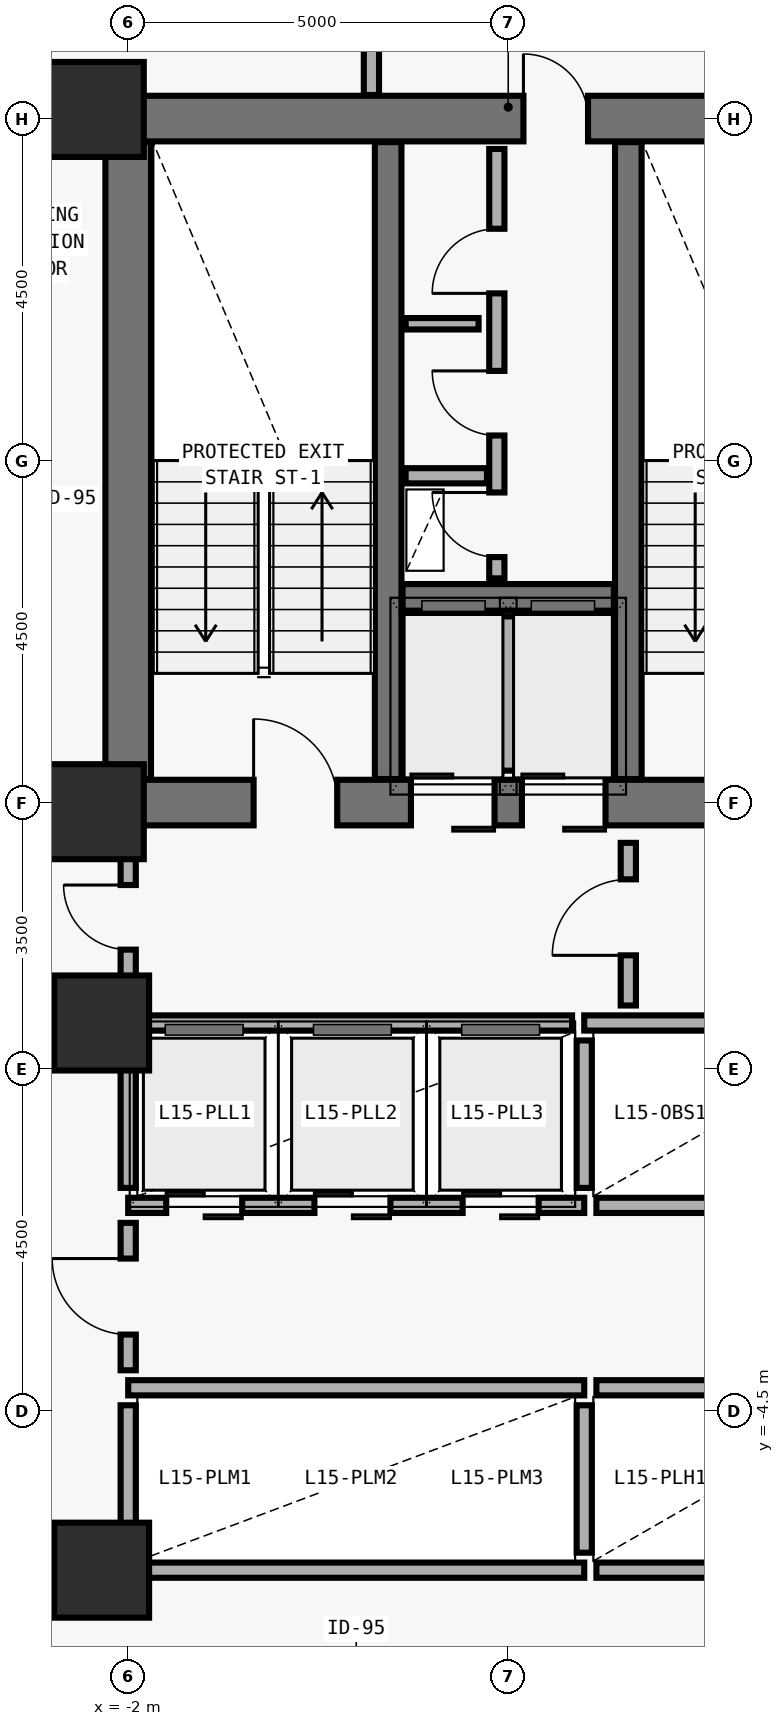
"""IFC4 building model, lengths in metres.
Left out: names, types, materials, properties, quantities, classifications, styles, units other than length and angle.
Written with IfcOpenShell. Run it as: python <this file> out.ifc"""

import sys

from ifc_helpers import new_model, si_unit, direction, frame, frame_2d, origin, origin_2d, place, context, subcontext, project, spatial, rectangle, extrude, element, fill, save


model = new_model("IFC4")
c1 = context("Model", 3, precision=1e-05, world=origin(), true_north=direction((0.0, 1.0)))
c2 = subcontext(c1, "Body", "Model", "MODEL_VIEW")
j1 = project(units=[si_unit("LENGTHUNIT", "METRE"), si_unit("PLANEANGLEUNIT", "RADIAN")], contexts=[c1])
p1 = place(None, origin())
s1 = spatial("IfcSite", under=j1, at=p1, CompositionType="ELEMENT")
p2 = place(p1, origin())
s2 = spatial("IfcBuilding", under=s1, at=p2, CompositionType="ELEMENT")
p3 = place(p2, frame((0.0, 0.0, 62.7)))
s3 = spatial("IfcBuildingStorey", under=s2, at=p3, CompositionType="ELEMENT", Elevation=62.7)
p4 = place(p3, frame((-2.0, 3.5, 0.0), z_axis=(0.0, 0.0, 1.0), x_axis=(1.0, 0.0, 0.0)))
e1 = element("IfcWall", 1, at=p4, inside=s3, PredefinedType="SHEAR", context=c2, shape_type="SweptSolid", body=[
    extrude(rectangle(XDim=10.0, YDim=0.6, at=frame_2d((5.0, 0.0))), origin(), (0.0, 0.0, 1.0), 3.892),
])
p5 = place(p4, frame((1.65, 0.0, 0.0)))
e2 = element("IfcOpeningElement", 2, at=p5, cuts=e1, PredefinedType="OPENING", context=c2, shape_type="SweptSolid", body=[
    extrude(rectangle(XDim=1.1, YDim=2.15, at=frame_2d((0.55, 1.075))), frame((0.0, 0.31, 0.0), z_axis=(0.0, -1.0, 0.0), x_axis=(1.0, 0.0, 0.0)), (0.0, 0.0, 1.0), 0.62),
])
p6 = place(p4, frame((7.65, 0.0, 0.0)))
e3 = element("IfcOpeningElement", 3, at=p6, cuts=e1, PredefinedType="OPENING", context=c2, shape_type="SweptSolid", body=[
    extrude(rectangle(XDim=1.1, YDim=2.15, at=frame_2d((0.55, 1.075))), frame((0.0, 0.31, 0.0), z_axis=(0.0, -1.0, 0.0), x_axis=(1.0, 0.0, 0.0)), (0.0, 0.0, 1.0), 0.62),
])
p7 = place(p4, frame((3.72, 0.0, 0.0)))
e4 = element("IfcOpeningElement", 4, at=p7, cuts=e1, PredefinedType="OPENING", context=c2, shape_type="SweptSolid", body=[
    extrude(rectangle(XDim=1.1, YDim=2.2, at=frame_2d((0.55, 1.1))), frame((0.0, 0.31, 0.0), z_axis=(0.0, -1.0, 0.0), x_axis=(1.0, 0.0, 0.0)), (0.0, 0.0, 1.0), 0.62),
])
p8 = place(p4, frame((5.18, 0.0, 0.0)))
e5 = element("IfcOpeningElement", 5, at=p8, cuts=e1, PredefinedType="OPENING", context=c2, shape_type="SweptSolid", body=[
    extrude(rectangle(XDim=1.1, YDim=2.2, at=frame_2d((0.55, 1.1))), frame((0.0, 0.31, 0.0), z_axis=(0.0, -1.0, 0.0), x_axis=(1.0, 0.0, 0.0)), (0.0, 0.0, 1.0), 0.62),
])
p9 = place(p3, frame((-2.0, 12.5, 0.0), z_axis=(0.0, 0.0, 1.0), x_axis=(1.0, 0.0, 0.0)))
e6 = element("IfcWall", 6, at=p9, inside=s3, PredefinedType="SHEAR", context=c2, shape_type="SweptSolid", body=[
    extrude(rectangle(XDim=10.0, YDim=0.6, at=frame_2d((5.0, 0.0))), origin(), (0.0, 0.0, 1.0), 3.892),
])
p10 = place(p9, frame((5.2, 0.0, 0.0)))
e7 = element("IfcOpeningElement", 7, at=p10, cuts=e6, PredefinedType="OPENING", context=c2, shape_type="SweptSolid", body=[
    extrude(rectangle(XDim=0.85, YDim=2.1, at=frame_2d((0.425, 1.05))), frame((0.0, 0.31, 0.0), z_axis=(0.0, -1.0, 0.0), x_axis=(1.0, 0.0, 0.0)), (0.0, 0.0, 1.0), 0.62),
])
p11 = place(p3, frame((-2.0, 3.81, 0.0), z_axis=(0.0, 0.0, 1.0), x_axis=(0.0, 1.0, 0.0)))
e8 = element("IfcWall", 8, at=p11, inside=s3, PredefinedType="SHEAR", context=c2, shape_type="SweptSolid", body=[
    extrude(rectangle(XDim=8.38, YDim=0.6, at=frame_2d((4.19, 0.0))), origin(), (0.0, 0.0, 1.0), 3.892),
])
for number, where, z_axis, x_axis in (
    (9, (1.42, 3.81, 0.0), (0.0, 0.0, 1.0), (0.0, 1.0, 0.0)),
    (10, (4.58, 3.81, 0.0), (0.0, 0.0, 1.0), (0.0, 1.0, 0.0)),
):
    element("IfcWall", number, at=place(p3, frame(where, z_axis=z_axis, x_axis=x_axis)), inside=s3, PredefinedType="SHEAR", context=c2, shape_type="SweptSolid", body=[
        extrude(rectangle(XDim=8.38, YDim=0.35, at=frame_2d((4.19, 0.0))), origin(), (0.0, 0.0, 1.0), 3.892),
    ])
p12 = place(p3, frame((1.61, 6.2, 0.0), z_axis=(0.0, 0.0, 1.0), x_axis=(1.0, 0.0, 0.0)))
e11 = element("IfcWall", 11, at=p12, inside=s3, PredefinedType="SHEAR", context=c2, shape_type="SweptSolid", body=[
    extrude(rectangle(XDim=2.78, YDim=0.35, at=frame_2d((1.39, 0.0))), origin(), (0.0, 0.0, 1.0), 3.892),
])
for number, where, z_axis, x_axis in (
    (12, (-2.42, 12.62, 0.0), (0.0, 0.0, 1.0), (1.0, 0.0, 0.0)),
    (13, (-2.42, 3.38, 0.0), (0.0, 0.0, 1.0), (1.0, 0.0, 0.0)),
    (14, (-2.35, 0.6, 0.0), (0.0, 0.0, 1.0), (1.0, 0.0, 0.0)),
    (15, (-2.35, -6.6, 0.0), (0.0, 0.0, 1.0), (1.0, 0.0, 0.0)),
):
    element("IfcColumn", number, at=place(p3, frame(where, z_axis=z_axis, x_axis=x_axis)), inside=s3, PredefinedType="COLUMN", context=c2, shape_type="SweptSolid", body=[
        extrude(rectangle(XDim=1.25, YDim=1.25, at=origin_2d()), origin(), (0.0, 0.0, 1.0), 3.875),
    ])
p13 = place(p3, frame((3.0, 3.92, 0.0), z_axis=(0.0, 0.0, 1.0), x_axis=(0.0, 1.0, 0.0)))
e16 = element("IfcWall", 16, at=p13, inside=s3, PredefinedType="SOLIDWALL", context=c2, shape_type="SweptSolid", body=[
    extrude(rectangle(XDim=2.03, YDim=0.2, at=frame_2d((1.015, 0.0))), origin(), (0.0, 0.0, 1.0), 3.64),
])
p14 = place(p3, frame((1.65, 7.8, 0.0), z_axis=(0.0, 0.0, 1.0), x_axis=(1.0, 0.0, 0.0)))
e17 = element("IfcWall", 17, at=p14, inside=s3, PredefinedType="SOLIDWALL", context=c2, shape_type="SweptSolid", body=[
    extrude(rectangle(XDim=1.07, YDim=0.2, at=frame_2d((0.535, 0.0))), origin(), (0.0, 0.0, 1.0), 3.64),
])
p15 = place(p3, frame((4.0, 0.6, 0.0), z_axis=(0.0, 0.0, 1.0), x_axis=(1.0, 0.0, 0.0)))
e18 = element("IfcWall", 18, at=p15, inside=s3, PredefinedType="SOLIDWALL", context=c2, shape_type="SweptSolid", body=[
    extrude(rectangle(XDim=3.88, YDim=0.2, at=frame_2d((1.94, 0.0))), origin(), (0.0, 0.0, 1.0), 3.122),
])
p16 = place(p3, frame((-2.0, -1.8, 0.0), z_axis=(0.0, 0.0, 1.0), x_axis=(1.0, 0.0, 0.0)))
e19 = element("IfcWall", 19, at=p16, inside=s3, PredefinedType="SOLIDWALL", context=c2, shape_type="SweptSolid", body=[
    extrude(rectangle(XDim=6.0, YDim=0.2, at=frame_2d((3.0, 0.0))), origin(), (0.0, 0.0, 1.0), 3.64),
])
p17 = place(p16, frame((0.5, 0.0, 0.0)))
e20 = element("IfcOpeningElement", 20, at=p17, cuts=e19, PredefinedType="OPENING", context=c2, shape_type="SweptSolid", body=[
    extrude(rectangle(XDim=1.0, YDim=2.2, at=frame_2d((0.5, 1.1))), frame((0.0, 0.11, 0.0), z_axis=(0.0, -1.0, 0.0), x_axis=(1.0, 0.0, 0.0)), (0.0, 0.0, 1.0), 0.22),
])
p18 = place(p16, frame((2.45, 0.0, 0.0)))
e21 = element("IfcOpeningElement", 21, at=p18, cuts=e19, PredefinedType="OPENING", context=c2, shape_type="SweptSolid", body=[
    extrude(rectangle(XDim=1.0, YDim=2.2, at=frame_2d((0.5, 1.1))), frame((0.0, 0.11, 0.0), z_axis=(0.0, -1.0, 0.0), x_axis=(1.0, 0.0, 0.0)), (0.0, 0.0, 1.0), 0.22),
])
p19 = place(p16, frame((4.4, 0.0, 0.0)))
e22 = element("IfcOpeningElement", 22, at=p19, cuts=e19, PredefinedType="OPENING", context=c2, shape_type="SweptSolid", body=[
    extrude(rectangle(XDim=1.0, YDim=2.2, at=frame_2d((0.5, 1.1))), frame((0.0, 0.11, 0.0), z_axis=(0.0, -1.0, 0.0), x_axis=(1.0, 0.0, 0.0)), (0.0, 0.0, 1.0), 0.22),
])
p20 = place(p3, frame((-2.0, -1.57, 0.0), z_axis=(0.0, 0.0, 1.0), x_axis=(0.0, 1.0, 0.0)))
e23 = element("IfcWall", 23, at=p20, inside=s3, PredefinedType="SOLIDWALL", context=c2, shape_type="SweptSolid", body=[
    extrude(rectangle(XDim=2.05, YDim=0.2, at=frame_2d((1.025, 0.0))), origin(), (0.0, 0.0, 1.0), 3.022),
])
p21 = place(p3, frame((4.16, -1.8, 0.0), z_axis=(0.0, 0.0, 1.0), x_axis=(1.0, 0.0, 0.0)))
e24 = element("IfcWall", 24, at=p21, inside=s3, PredefinedType="SOLIDWALL", context=c2, shape_type="SweptSolid", body=[
    extrude(rectangle(XDim=3.84, YDim=0.2, at=frame_2d((1.92, 0.0))), origin(), (0.0, 0.0, 1.0), 3.64),
])
p22 = place(p3, frame((4.0, -1.57, 0.0), z_axis=(0.0, 0.0, 1.0), x_axis=(0.0, 1.0, 0.0)))
e25 = element("IfcWall", 25, at=p22, inside=s3, PredefinedType="SOLIDWALL", context=c2, shape_type="SweptSolid", body=[
    extrude(rectangle(XDim=1.94, YDim=0.2, at=frame_2d((0.97, 0.0))), origin(), (0.0, 0.0, 1.0), 3.64),
])
p23 = place(p3, frame((-2.0, -4.2, 0.0), z_axis=(0.0, 0.0, 1.0), x_axis=(1.0, 0.0, 0.0)))
e26 = element("IfcWall", 26, at=p23, inside=s3, PredefinedType="SOLIDWALL", context=c2, shape_type="SweptSolid", body=[
    extrude(rectangle(XDim=6.0, YDim=0.2, at=frame_2d((3.0, 0.0))), origin(), (0.0, 0.0, 1.0), 3.64),
])
p24 = place(p3, frame((-2.0, -6.6, 0.0), z_axis=(0.0, 0.0, 1.0), x_axis=(1.0, 0.0, 0.0)))
e27 = element("IfcWall", 27, at=p24, inside=s3, PredefinedType="SOLIDWALL", context=c2, shape_type="SweptSolid", body=[
    extrude(rectangle(XDim=6.0, YDim=0.2, at=frame_2d((3.0, 0.0))), origin(), (0.0, 0.0, 1.0), 3.122),
])
p25 = place(p3, frame((-2.0, -6.37, 0.0), z_axis=(0.0, 0.0, 1.0), x_axis=(0.0, 1.0, 0.0)))
e28 = element("IfcWall", 28, at=p25, inside=s3, PredefinedType="SOLIDWALL", context=c2, shape_type="SweptSolid", body=[
    extrude(rectangle(XDim=1.94, YDim=0.2, at=frame_2d((0.97, 0.0))), origin(), (0.0, 0.0, 1.0), 3.022),
])
p26 = place(p3, frame((4.16, -4.2, 0.0), z_axis=(0.0, 0.0, 1.0), x_axis=(1.0, 0.0, 0.0)))
e29 = element("IfcWall", 29, at=p26, inside=s3, PredefinedType="SOLIDWALL", context=c2, shape_type="SweptSolid", body=[
    extrude(rectangle(XDim=3.84, YDim=0.2, at=frame_2d((1.92, 0.0))), origin(), (0.0, 0.0, 1.0), 3.64),
])
p27 = place(p3, frame((4.16, -6.6, 0.0), z_axis=(0.0, 0.0, 1.0), x_axis=(1.0, 0.0, 0.0)))
e30 = element("IfcWall", 30, at=p27, inside=s3, PredefinedType="SOLIDWALL", context=c2, shape_type="SweptSolid", body=[
    extrude(rectangle(XDim=3.84, YDim=0.2, at=frame_2d((1.92, 0.0))), origin(), (0.0, 0.0, 1.0), 3.122),
])
p28 = place(p3, frame((4.0, -6.37, 0.0), z_axis=(0.0, 0.0, 1.0), x_axis=(0.0, 1.0, 0.0)))
e31 = element("IfcWall", 31, at=p28, inside=s3, PredefinedType="SOLIDWALL", context=c2, shape_type="SweptSolid", body=[
    extrude(rectangle(XDim=1.94, YDim=0.2, at=frame_2d((0.97, 0.0))), origin(), (0.0, 0.0, 1.0), 3.64),
])
p29 = place(p3, frame((2.85, 6.45, 0.0), z_axis=(0.0, 0.0, 1.0), x_axis=(0.0, 1.0, 0.0)))
e32 = element("IfcWall", 32, at=p29, inside=s3, PredefinedType="MOVABLE", context=c2, shape_type="SweptSolid", body=[
    extrude(rectangle(XDim=5.65, YDim=0.2, at=frame_2d((2.825, 0.0))), origin(), (0.0, 0.0, 1.0), 3.64),
])
p30 = place(p29, frame((1.88, 0.0, 0.0)))
e33 = element("IfcOpeningElement", 33, at=p30, cuts=e32, PredefinedType="OPENING", context=c2, shape_type="SweptSolid", body=[
    extrude(rectangle(XDim=0.85, YDim=2.05, at=frame_2d((0.425, 1.025))), frame((0.0, 0.11, 0.0), z_axis=(0.0, -1.0, 0.0), x_axis=(1.0, 0.0, 0.0)), (0.0, 0.0, 1.0), 0.22),
])
p31 = place(p29, frame((3.75, 0.0, 0.0)))
e34 = element("IfcOpeningElement", 34, at=p31, cuts=e32, PredefinedType="OPENING", context=c2, shape_type="SweptSolid", body=[
    extrude(rectangle(XDim=0.85, YDim=2.1, at=frame_2d((0.425, 1.05))), frame((0.0, 0.11, 0.0), z_axis=(0.0, -1.0, 0.0), x_axis=(1.0, 0.0, 0.0)), (0.0, 0.0, 1.0), 0.22),
])
p32 = place(p29, frame((0.28, 0.0, 0.0)))
e35 = element("IfcOpeningElement", 35, at=p32, cuts=e32, PredefinedType="OPENING", context=c2, shape_type="SweptSolid", body=[
    extrude(rectangle(XDim=0.85, YDim=2.1, at=frame_2d((0.425, 1.05))), frame((0.0, 0.11, 0.0), z_axis=(0.0, -1.0, 0.0), x_axis=(1.0, 0.0, 0.0)), (0.0, 0.0, 1.0), 0.22),
])
p33 = place(p3, frame((4.58, 0.83, 0.0), z_axis=(0.0, 0.0, 1.0), x_axis=(0.0, 1.0, 0.0)))
e36 = element("IfcWall", 36, at=p33, inside=s3, PredefinedType="MOVABLE", context=c2, shape_type="SweptSolid", body=[
    extrude(rectangle(XDim=2.14, YDim=0.2, at=frame_2d((1.07, 0.0))), origin(), (0.0, 0.0, 1.0), 3.64),
])
p34 = place(p33, frame((0.66, 0.0, 0.0)))
e37 = element("IfcOpeningElement", 37, at=p34, cuts=e36, PredefinedType="OPENING", context=c2, shape_type="SweptSolid", body=[
    extrude(rectangle(XDim=1.0, YDim=2.1, at=frame_2d((0.5, 1.05))), frame((0.0, 0.11, 0.0), z_axis=(0.0, -1.0, 0.0), x_axis=(1.0, 0.0, 0.0)), (0.0, 0.0, 1.0), 0.22),
])
p35 = place(p3, frame((-2.0, 0.72, 0.0), z_axis=(0.0, 0.0, 1.0), x_axis=(0.0, 1.0, 0.0)))
e38 = element("IfcWall", 38, at=p35, inside=s3, PredefinedType="MOVABLE", context=c2, shape_type="SweptSolid", body=[
    extrude(rectangle(XDim=2.25, YDim=0.2, at=frame_2d((1.125, 0.0))), origin(), (0.0, 0.0, 1.0), 2.872),
])
p36 = place(p35, frame((0.845, 0.0, 0.0)))
e39 = element("IfcOpeningElement", 39, at=p36, cuts=e38, PredefinedType="OPENING", context=c2, shape_type="SweptSolid", body=[
    extrude(rectangle(XDim=0.85, YDim=2.1, at=frame_2d((0.425, 1.05))), frame((0.0, 0.11, 0.0), z_axis=(0.0, -1.0, 0.0), x_axis=(1.0, 0.0, 0.0)), (0.0, 0.0, 1.0), 0.22),
])
p37 = place(p3, frame((-2.0, -3.97, 0.0), z_axis=(0.0, 0.0, 1.0), x_axis=(0.0, 1.0, 0.0)))
e40 = element("IfcWall", 40, at=p37, inside=s3, PredefinedType="MOVABLE", context=c2, shape_type="SweptSolid", body=[
    extrude(rectangle(XDim=1.94, YDim=0.2, at=frame_2d((0.97, 0.0))), origin(), (0.0, 0.0, 1.0), 3.022),
])
p38 = place(p37, frame((0.47, 0.0, 0.0)))
e41 = element("IfcOpeningElement", 41, at=p38, cuts=e40, PredefinedType="OPENING", context=c2, shape_type="SweptSolid", body=[
    extrude(rectangle(XDim=1.0, YDim=2.1, at=frame_2d((0.5, 1.05))), frame((0.0, 0.11, 0.0), z_axis=(0.0, -1.0, 0.0), x_axis=(1.0, 0.0, 0.0)), (0.0, 0.0, 1.0), 0.22),
])
p39 = place(p3, frame((1.65, 9.8, 0.0), z_axis=(0.0, 0.0, 1.0), x_axis=(1.0, 0.0, 0.0)))
e42 = element("IfcWall", 42, at=p39, inside=s3, PredefinedType="PARTITIONING", context=c2, shape_type="SweptSolid", body=[
    extrude(rectangle(XDim=0.96, YDim=0.15, at=frame_2d((0.48, 0.0))), origin(), (0.0, 0.0, 1.0), 3.64),
])
p40 = place(p3, frame((-1.88, 0.6, 0.0), z_axis=(0.0, 0.0, 1.0), x_axis=(1.0, 0.0, 0.0)))
e43 = element("IfcWall", 43, at=p40, inside=s3, PredefinedType="MOVABLE", context=c2, shape_type="SweptSolid", body=[
    extrude(rectangle(XDim=5.72, YDim=0.2, at=frame_2d((2.86, 0.0))), origin(), (0.0, 0.0, 1.0), 3.122),
])
p41 = place(p3, frame((1.2, 14.7, 0.0), z_axis=(0.0, 0.0, 1.0), x_axis=(0.0, -1.0, 0.0)))
e44 = element("IfcWall", 44, at=p41, inside=s3, PredefinedType="MOVABLE", context=c2, shape_type="SweptSolid", body=[
    extrude(rectangle(XDim=1.89, YDim=0.2, at=frame_2d((0.945, 0.0))), origin(), (0.0, 0.0, 1.0), 3.64),
])
p42 = place(p5, origin())
e45 = element("IfcDoor", 45, at=p42, inside=s3, OperationType="SINGLE_SWING_LEFT", PredefinedType="DOOR", context=c2, shape_type="SweptSolid", body=[
    extrude(rectangle(XDim=1.1, YDim=2.15, at=frame_2d((0.55, 1.075))), frame((0.0, 0.025, 0.0), z_axis=(0.0, -1.0, 0.0), x_axis=(1.0, 0.0, 0.0)), (0.0, 0.0, 1.0), 0.05),
])
fill(e2, e45)
p43 = place(p7, origin())
e46 = element("IfcDoor", 46, at=p43, inside=s3, OperationType="DOUBLE_DOOR_SLIDING", PredefinedType="DOOR", context=c2, shape_type="SweptSolid", body=[
    extrude(rectangle(XDim=1.1, YDim=2.2, at=frame_2d((0.55, 1.1))), frame((0.0, 0.025, 0.0), z_axis=(0.0, -1.0, 0.0), x_axis=(1.0, 0.0, 0.0)), (0.0, 0.0, 1.0), 0.05),
])
fill(e4, e46)
p44 = place(p8, origin())
e47 = element("IfcDoor", 47, at=p44, inside=s3, OperationType="DOUBLE_DOOR_SLIDING", PredefinedType="DOOR", context=c2, shape_type="SweptSolid", body=[
    extrude(rectangle(XDim=1.1, YDim=2.2, at=frame_2d((0.55, 1.1))), frame((0.0, 0.025, 0.0), z_axis=(0.0, -1.0, 0.0), x_axis=(1.0, 0.0, 0.0)), (0.0, 0.0, 1.0), 0.05),
])
fill(e5, e47)
p45 = place(p10, origin())
e48 = element("IfcDoor", 48, at=p45, inside=s3, OperationType="SINGLE_SWING_LEFT", PredefinedType="DOOR", context=c2, shape_type="SweptSolid", body=[
    extrude(rectangle(XDim=0.85, YDim=2.1, at=frame_2d((0.425, 1.05))), frame((0.0, 0.025, 0.0), z_axis=(0.0, -1.0, 0.0), x_axis=(1.0, 0.0, 0.0)), (0.0, 0.0, 1.0), 0.05),
])
fill(e7, e48)
p46 = place(p30, origin())
e49 = element("IfcDoor", 49, at=p46, inside=s3, OperationType="SINGLE_SWING_RIGHT", PredefinedType="DOOR", context=c2, shape_type="SweptSolid", body=[
    extrude(rectangle(XDim=0.85, YDim=2.05, at=frame_2d((0.425, 1.025))), frame((0.0, 0.025, 0.0), z_axis=(0.0, -1.0, 0.0), x_axis=(1.0, 0.0, 0.0)), (0.0, 0.0, 1.0), 0.05),
])
fill(e33, e49)
p47 = place(p31, origin())
e50 = element("IfcDoor", 50, at=p47, inside=s3, OperationType="SINGLE_SWING_LEFT", PredefinedType="DOOR", context=c2, shape_type="SweptSolid", body=[
    extrude(rectangle(XDim=0.85, YDim=2.1, at=frame_2d((0.425, 1.05))), frame((0.0, 0.025, 0.0), z_axis=(0.0, -1.0, 0.0), x_axis=(1.0, 0.0, 0.0)), (0.0, 0.0, 1.0), 0.05),
])
fill(e34, e50)
p48 = place(p32, origin())
e51 = element("IfcDoor", 51, at=p48, inside=s3, OperationType="SINGLE_SWING_RIGHT", PredefinedType="DOOR", context=c2, shape_type="SweptSolid", body=[
    extrude(rectangle(XDim=0.85, YDim=2.1, at=frame_2d((0.425, 1.05))), frame((0.0, 0.025, 0.0), z_axis=(0.0, -1.0, 0.0), x_axis=(1.0, 0.0, 0.0)), (0.0, 0.0, 1.0), 0.05),
])
fill(e35, e51)
p49 = place(p34, origin())
e52 = element("IfcDoor", 52, at=p49, inside=s3, OperationType="SINGLE_SWING_LEFT", PredefinedType="DOOR", context=c2, shape_type="SweptSolid", body=[
    extrude(rectangle(XDim=1.0, YDim=2.1, at=frame_2d((0.5, 1.05))), frame((0.0, 0.025, 0.0), z_axis=(0.0, -1.0, 0.0), x_axis=(1.0, 0.0, 0.0)), (0.0, 0.0, 1.0), 0.05),
])
fill(e37, e52)
p50 = place(p36, origin())
e53 = element("IfcDoor", 53, at=p50, inside=s3, OperationType="SINGLE_SWING_RIGHT", PredefinedType="DOOR", context=c2, shape_type="SweptSolid", body=[
    extrude(rectangle(XDim=0.85, YDim=2.1, at=frame_2d((0.425, 1.05))), frame((0.0, 0.025, 0.0), z_axis=(0.0, -1.0, 0.0), x_axis=(1.0, 0.0, 0.0)), (0.0, 0.0, 1.0), 0.05),
])
fill(e39, e53)
p51 = place(p38, origin())
e54 = element("IfcDoor", 54, at=p51, inside=s3, OperationType="SINGLE_SWING_RIGHT", PredefinedType="DOOR", context=c2, shape_type="SweptSolid", body=[
    extrude(rectangle(XDim=1.0, YDim=2.1, at=frame_2d((0.5, 1.05))), frame((0.0, 0.025, 0.0), z_axis=(0.0, -1.0, 0.0), x_axis=(1.0, 0.0, 0.0)), (0.0, 0.0, 1.0), 0.05),
])
fill(e41, e54)
p52 = place(p17, origin())
e55 = element("IfcDoor", 55, at=p52, inside=s3, OperationType="DOUBLE_DOOR_SLIDING", PredefinedType="DOOR", context=c2, shape_type="SweptSolid", body=[
    extrude(rectangle(XDim=1.0, YDim=2.2, at=frame_2d((0.5, 1.1))), frame((0.0, 0.025, 0.0), z_axis=(0.0, -1.0, 0.0), x_axis=(1.0, 0.0, 0.0)), (0.0, 0.0, 1.0), 0.05),
])
fill(e20, e55)
p53 = place(p18, origin())
e56 = element("IfcDoor", 56, at=p53, inside=s3, OperationType="DOUBLE_DOOR_SLIDING", PredefinedType="DOOR", context=c2, shape_type="SweptSolid", body=[
    extrude(rectangle(XDim=1.0, YDim=2.2, at=frame_2d((0.5, 1.1))), frame((0.0, 0.025, 0.0), z_axis=(0.0, -1.0, 0.0), x_axis=(1.0, 0.0, 0.0)), (0.0, 0.0, 1.0), 0.05),
])
fill(e21, e56)
p54 = place(p19, origin())
e57 = element("IfcDoor", 57, at=p54, inside=s3, OperationType="DOUBLE_DOOR_SLIDING", PredefinedType="DOOR", context=c2, shape_type="SweptSolid", body=[
    extrude(rectangle(XDim=1.0, YDim=2.2, at=frame_2d((0.5, 1.1))), frame((0.0, 0.025, 0.0), z_axis=(0.0, -1.0, 0.0), x_axis=(1.0, 0.0, 0.0)), (0.0, 0.0, 1.0), 0.05),
])
fill(e22, e57)
save(model, sys.argv[1])
